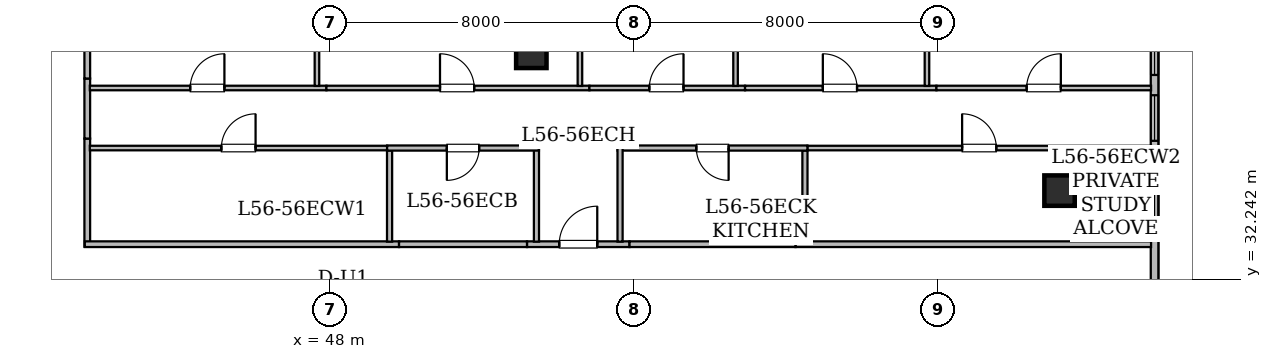
"""IFC4 building model, lengths in metres.
Left out: names, types, materials, properties, quantities, classifications, styles, units other than length and angle.
Written with IfcOpenShell. Run it as: python <this file> out.ifc"""

import sys

from ifc_helpers import new_model, si_unit, direction, frame, frame_2d, origin, origin_2d, place, context, subcontext, project, spatial, rectangle, hollow_rectangle, extrude, element, fill, save


model = new_model("IFC4")
c1 = context("Model", 3, precision=1e-05, world=origin(), true_north=direction((0.0, 1.0)))
c2 = subcontext(c1, "Body", "Model", "MODEL_VIEW")
j1 = project(units=[si_unit("LENGTHUNIT", "METRE"), si_unit("PLANEANGLEUNIT", "RADIAN")], contexts=[c1])
p1 = place(None, origin())
s1 = spatial("IfcSite", under=j1, at=p1, CompositionType="ELEMENT")
p2 = place(p1, origin())
s2 = spatial("IfcBuilding", under=s1, at=p2, CompositionType="ELEMENT")
p3 = place(p2, frame((0.0, 0.0, 220.85)))
s3 = spatial("IfcBuildingStorey", under=s2, at=p3, CompositionType="ELEMENT", Elevation=220.85)
for number, where, z_axis, x_axis in (
    (1, (67.2, 34.575, 0.0), (0.0, 0.0, 1.0), (1.0, 0.0, 0.0)),
    (2, (53.3, 38.2, 0.0), (0.0, 0.0, 1.0), (1.0, 0.0, 0.0)),
):
    element("IfcColumn", number, at=place(p3, frame(where, z_axis=z_axis, x_axis=x_axis)), inside=s3, PredefinedType="COLUMN", context=c2, shape_type="SweptSolid", body=[
        extrude(hollow_rectangle(XDim=0.8, YDim=0.8, WallThickness=0.04, at=origin_2d()), origin(), (0.0, 0.0, 1.0), 3.65),
    ])
p4 = place(p3, frame((69.7, 39.896, 0.0), z_axis=(0.0, 0.0, 1.0), x_axis=(0.0, -1.0, 0.0)))
e3 = element("IfcWall", 3, at=p4, inside=s3, PredefinedType="STANDARD", context=c2, shape_type="SweptSolid", body=[
    extrude(rectangle(XDim=8.863, YDim=0.2, at=frame_2d((4.432, 0.0))), origin(), (0.0, 0.0, 1.0), 3.43),
])
p5 = place(p4, frame((4.641, 0.0, 0.85)))
e4 = element("IfcOpeningElement", 4, at=p5, cuts=e3, PredefinedType="OPENING", context=c2, shape_type="SweptSolid", body=[
    extrude(rectangle(XDim=1.65, YDim=1.55, at=frame_2d((0.825, 0.775))), frame((0.0, 0.11, 0.0), z_axis=(0.0, -1.0, 0.0), x_axis=(1.0, 0.0, 0.0)), (0.0, 0.0, 1.0), 0.22),
])
p6 = place(p4, frame((2.811, 0.0, 0.8)))
e5 = element("IfcOpeningElement", 5, at=p6, cuts=e3, PredefinedType="OPENING", context=c2, shape_type="SweptSolid", body=[
    extrude(rectangle(XDim=1.2, YDim=1.5, at=frame_2d((0.6, 0.75))), frame((0.0, 0.11, 0.0), z_axis=(0.0, -1.0, 0.0), x_axis=(1.0, 0.0, 0.0)), (0.0, 0.0, 1.0), 0.22),
])
p7 = place(p4, frame((0.628, 0.0, 0.85)))
e6 = element("IfcOpeningElement", 6, at=p7, cuts=e3, PredefinedType="OPENING", context=c2, shape_type="SweptSolid", body=[
    extrude(rectangle(XDim=1.65, YDim=1.55, at=frame_2d((0.825, 0.775))), frame((0.0, 0.11, 0.0), z_axis=(0.0, -1.0, 0.0), x_axis=(1.0, 0.0, 0.0)), (0.0, 0.0, 1.0), 0.22),
])
p8 = place(p3, frame((41.615, 35.944, 0.0), z_axis=(0.0, 0.0, 1.0), x_axis=(0.0, -1.0, 0.0)))
e7 = element("IfcWall", 7, at=p8, inside=s3, PredefinedType="STANDARD", context=c2, shape_type="SweptSolid", body=[
    extrude(rectangle(XDim=2.844, YDim=0.15, at=frame_2d((1.422, 0.0))), origin(), (0.0, 0.0, 1.0), 3.065),
])
p9 = place(p3, frame((41.55, 33.165, 0.0), z_axis=(0.0, 0.0, 1.0), x_axis=(1.0, 0.0, 0.0)))
e8 = element("IfcWall", 8, at=p9, inside=s3, PredefinedType="STANDARD", context=c2, shape_type="SweptSolid", body=[
    extrude(rectangle(XDim=8.269, YDim=0.15, at=frame_2d((4.135, 0.0))), origin(), (0.0, 0.0, 1.0), 3.065),
])
p10 = place(p3, frame((60.251, 33.165, 0.0), z_axis=(0.0, 0.0, 1.0), x_axis=(1.0, 0.0, 0.0)))
e9 = element("IfcWall", 9, at=p10, inside=s3, PredefinedType="STANDARD", context=c2, shape_type="SweptSolid", body=[
    extrude(rectangle(XDim=9.357, YDim=0.15, at=frame_2d((4.678, 0.0))), origin(), (0.0, 0.0, 1.0), 2.887),
])
p11 = place(p3, frame((41.615, 37.524, 0.0), z_axis=(0.0, 0.0, 1.0), x_axis=(0.0, -1.0, 0.0)))
e10 = element("IfcWall", 10, at=p11, inside=s3, PredefinedType="STANDARD", context=c2, shape_type="SweptSolid", body=[
    extrude(rectangle(XDim=1.58, YDim=0.15, at=frame_2d((0.79, 0.0))), origin(), (0.0, 0.0, 1.0), 2.725),
])
p12 = place(p3, frame((53.186, 33.165, 0.0), z_axis=(0.0, 0.0, 1.0), x_axis=(1.0, 0.0, 0.0)))
e11 = element("IfcWall", 11, at=p12, inside=s3, PredefinedType="STANDARD", context=c2, shape_type="SweptSolid", body=[
    extrude(rectangle(XDim=2.698, YDim=0.15, at=frame_2d((1.349, 0.0))), origin(), (0.0, 0.0, 1.0), 2.725),
])
p13 = place(p12, frame((0.849, 0.0, 0.0)))
e12 = element("IfcOpeningElement", 12, at=p13, cuts=e11, PredefinedType="OPENING", context=c2, shape_type="SweptSolid", body=[
    extrude(rectangle(XDim=1.0, YDim=2.15, at=frame_2d((0.5, 1.075))), frame((0.0, 0.085, 0.0), z_axis=(0.0, -1.0, 0.0), x_axis=(1.0, 0.0, 0.0)), (0.0, 0.0, 1.0), 0.17),
])
p14 = place(p3, frame((49.819, 33.165, 0.0), z_axis=(0.0, 0.0, 1.0), x_axis=(1.0, 0.0, 0.0)))
e13 = element("IfcWall", 13, at=p14, inside=s3, PredefinedType="STANDARD", context=c2, shape_type="SweptSolid", body=[
    extrude(rectangle(XDim=3.367, YDim=0.15, at=frame_2d((1.684, 0.0))), origin(), (0.0, 0.0, 1.0), 2.725),
])
p15 = place(p3, frame((55.884, 33.165, 0.0), z_axis=(0.0, 0.0, 1.0), x_axis=(1.0, 0.0, 0.0)))
e14 = element("IfcWall", 14, at=p15, inside=s3, PredefinedType="STANDARD", context=c2, shape_type="SweptSolid", body=[
    extrude(rectangle(XDim=4.367, YDim=0.15, at=frame_2d((2.184, 0.0))), origin(), (0.0, 0.0, 1.0), 3.065),
])
p16 = place(p3, frame((41.615, 39.1, 0.0), z_axis=(0.0, 0.0, 1.0), x_axis=(0.0, -1.0, 0.0)))
e15 = element("IfcWall", 15, at=p16, inside=s3, PredefinedType="STANDARD", context=c2, shape_type="SweptSolid", body=[
    extrude(rectangle(XDim=1.576, YDim=0.15, at=frame_2d((0.788, 0.0))), origin(), (0.0, 0.0, 1.0), 2.725),
])
p17 = place(p3, frame((41.682, 35.695, 0.0), z_axis=(0.0, 0.0, 1.0), x_axis=(1.0, 0.0, 0.0)))
e16 = element("IfcWall", 16, at=p17, inside=s3, PredefinedType="PARTITIONING", context=c2, shape_type="SweptSolid", body=[
    extrude(rectangle(XDim=7.823, YDim=0.12, at=frame_2d((3.912, 0.0))), origin(), (0.0, 0.0, 1.0), 3.43),
])
p18 = place(p17, frame((3.462, 0.0, 0.0)))
e17 = element("IfcOpeningElement", 17, at=p18, cuts=e16, PredefinedType="OPENING", context=c2, shape_type="SweptSolid", body=[
    extrude(rectangle(XDim=0.9, YDim=2.1, at=frame_2d((0.45, 1.05))), frame((0.0, 0.07, 0.0), z_axis=(0.0, -1.0, 0.0), x_axis=(1.0, 0.0, 0.0)), (0.0, 0.0, 1.0), 0.14),
])
p19 = place(p3, frame((49.57, 35.63, 0.0), z_axis=(0.0, 0.0, 1.0), x_axis=(0.0, -1.0, 0.0)))
e18 = element("IfcWall", 18, at=p19, inside=s3, PredefinedType="PARTITIONING", context=c2, shape_type="SweptSolid", body=[
    extrude(rectangle(XDim=2.398, YDim=0.135, at=frame_2d((1.199, 0.0))), origin(), (0.0, 0.0, 1.0), 3.065),
])
p20 = place(p3, frame((60.565, 35.695, 0.0), z_axis=(0.0, 0.0, 1.0), x_axis=(1.0, 0.0, 0.0)))
e19 = element("IfcWall", 19, at=p20, inside=s3, PredefinedType="PARTITIONING", context=c2, shape_type="SweptSolid", body=[
    extrude(rectangle(XDim=9.043, YDim=0.12, at=frame_2d((4.521, 0.0))), origin(), (0.0, 0.0, 1.0), 2.725),
])
p21 = place(p20, frame((4.071, 0.0, 0.0)))
e20 = element("IfcOpeningElement", 20, at=p21, cuts=e19, PredefinedType="OPENING", context=c2, shape_type="SweptSolid", body=[
    extrude(rectangle(XDim=0.9, YDim=2.1, at=frame_2d((0.45, 1.05))), frame((0.0, 0.07, 0.0), z_axis=(0.0, -1.0, 0.0), x_axis=(1.0, 0.0, 0.0)), (0.0, 0.0, 1.0), 0.14),
])
p22 = place(p3, frame((60.5, 33.232, 0.0), z_axis=(0.0, 0.0, 1.0), x_axis=(0.0, 1.0, 0.0)))
e21 = element("IfcWall", 21, at=p22, inside=s3, PredefinedType="PARTITIONING", context=c2, shape_type="SweptSolid", body=[
    extrude(rectangle(XDim=2.398, YDim=0.135, at=frame_2d((1.199, 0.0))), origin(), (0.0, 0.0, 1.0), 3.065),
])
p23 = place(p3, frame((53.435, 33.232, 0.0), z_axis=(0.0, 0.0, 1.0), x_axis=(0.0, 1.0, 0.0)))
e22 = element("IfcWall", 22, at=p23, inside=s3, PredefinedType="PARTITIONING", context=c2, shape_type="SweptSolid", body=[
    extrude(rectangle(XDim=2.528, YDim=0.135, at=frame_2d((1.264, 0.0))), origin(), (0.0, 0.0, 1.0), 2.725),
])
p24 = place(p3, frame((53.5, 35.695, 0.0), z_axis=(0.0, 0.0, 1.0), x_axis=(-1.0, 0.0, 0.0)))
e23 = element("IfcWall", 23, at=p24, inside=s3, PredefinedType="PARTITIONING", context=c2, shape_type="SweptSolid", body=[
    extrude(rectangle(XDim=3.995, YDim=0.135, at=frame_2d((1.998, 0.0))), origin(), (0.0, 0.0, 1.0), 2.725),
])
p25 = place(p24, frame((1.573, 0.0, 0.0)))
e24 = element("IfcOpeningElement", 24, at=p25, cuts=e23, PredefinedType="OPENING", context=c2, shape_type="SweptSolid", body=[
    extrude(rectangle(XDim=0.85, YDim=2.1, at=frame_2d((0.425, 1.05))), frame((0.0, 0.077, 0.0), z_axis=(0.0, -1.0, 0.0), x_axis=(1.0, 0.0, 0.0)), (0.0, 0.0, 1.0), 0.155),
])
p26 = place(p3, frame((60.565, 35.695, 0.0), z_axis=(0.0, 0.0, 1.0), x_axis=(-1.0, 0.0, 0.0)))
e25 = element("IfcWall", 25, at=p26, inside=s3, PredefinedType="PARTITIONING", context=c2, shape_type="SweptSolid", body=[
    extrude(rectangle(XDim=4.995, YDim=0.135, at=frame_2d((2.498, 0.0))), origin(), (0.0, 0.0, 1.0), 3.43),
])
p27 = place(p26, frame((2.073, 0.0, 0.0)))
e26 = element("IfcOpeningElement", 26, at=p27, cuts=e25, PredefinedType="OPENING", context=c2, shape_type="SweptSolid", body=[
    extrude(rectangle(XDim=0.85, YDim=2.1, at=frame_2d((0.425, 1.05))), frame((0.0, 0.077, 0.0), z_axis=(0.0, -1.0, 0.0), x_axis=(1.0, 0.0, 0.0)), (0.0, 0.0, 1.0), 0.155),
])
p28 = place(p3, frame((55.635, 35.76, 0.0), z_axis=(0.0, 0.0, 1.0), x_axis=(0.0, -1.0, 0.0)))
e27 = element("IfcWall", 27, at=p28, inside=s3, PredefinedType="PARTITIONING", context=c2, shape_type="SweptSolid", body=[
    extrude(rectangle(XDim=2.528, YDim=0.135, at=frame_2d((1.264, 0.0))), origin(), (0.0, 0.0, 1.0), 3.065),
])
p29 = place(p3, frame((41.682, 37.275, 0.0), z_axis=(0.0, 0.0, 1.0), x_axis=(1.0, 0.0, 0.0)))
e28 = element("IfcWall", 28, at=p29, inside=s3, PredefinedType="PARTITIONING", context=c2, shape_type="SweptSolid", body=[
    extrude(rectangle(XDim=6.226, YDim=0.12, at=frame_2d((3.113, 0.0))), origin(), (0.0, 0.0, 1.0), 2.725),
])
p30 = place(p29, frame((2.642, 0.0, 0.0)))
e29 = element("IfcOpeningElement", 29, at=p30, cuts=e28, PredefinedType="OPENING", context=c2, shape_type="SweptSolid", body=[
    extrude(rectangle(XDim=0.9, YDim=2.1, at=frame_2d((0.45, 1.05))), frame((0.0, 0.07, 0.0), z_axis=(0.0, -1.0, 0.0), x_axis=(1.0, 0.0, 0.0)), (0.0, 0.0, 1.0), 0.14),
])
p31 = place(p3, frame((47.908, 37.275, 0.0), z_axis=(0.0, 0.0, 1.0), x_axis=(1.0, 0.0, 0.0)))
e30 = element("IfcWall", 30, at=p31, inside=s3, PredefinedType="PARTITIONING", context=c2, shape_type="SweptSolid", body=[
    extrude(rectangle(XDim=6.921, YDim=0.12, at=frame_2d((3.46, 0.0))), origin(), (0.0, 0.0, 1.0), 2.725),
])
p32 = place(p31, frame((2.989, 0.0, 0.0)))
e31 = element("IfcOpeningElement", 31, at=p32, cuts=e30, PredefinedType="OPENING", context=c2, shape_type="SweptSolid", body=[
    extrude(rectangle(XDim=0.9, YDim=2.1, at=frame_2d((0.45, 1.05))), frame((0.0, 0.07, 0.0), z_axis=(0.0, -1.0, 0.0), x_axis=(1.0, 0.0, 0.0)), (0.0, 0.0, 1.0), 0.14),
])
p33 = place(p3, frame((54.829, 37.275, 0.0), z_axis=(0.0, 0.0, 1.0), x_axis=(1.0, 0.0, 0.0)))
e32 = element("IfcWall", 32, at=p33, inside=s3, PredefinedType="PARTITIONING", context=c2, shape_type="SweptSolid", body=[
    extrude(rectangle(XDim=4.095, YDim=0.12, at=frame_2d((2.047, 0.0))), origin(), (0.0, 0.0, 1.0), 2.725),
])
p34 = place(p33, frame((1.576, 0.0, 0.0)))
e33 = element("IfcOpeningElement", 33, at=p34, cuts=e32, PredefinedType="OPENING", context=c2, shape_type="SweptSolid", body=[
    extrude(rectangle(XDim=0.9, YDim=2.1, at=frame_2d((0.45, 1.05))), frame((0.0, 0.07, 0.0), z_axis=(0.0, -1.0, 0.0), x_axis=(1.0, 0.0, 0.0)), (0.0, 0.0, 1.0), 0.14),
])
p35 = place(p3, frame((58.924, 37.275, 0.0), z_axis=(0.0, 0.0, 1.0), x_axis=(1.0, 0.0, 0.0)))
e34 = element("IfcWall", 34, at=p35, inside=s3, PredefinedType="PARTITIONING", context=c2, shape_type="SweptSolid", body=[
    extrude(rectangle(XDim=5.036, YDim=0.12, at=frame_2d((2.518, 0.0))), origin(), (0.0, 0.0, 1.0), 3.43),
])
p36 = place(p35, frame((2.047, 0.0, 0.0)))
e35 = element("IfcOpeningElement", 35, at=p36, cuts=e34, PredefinedType="OPENING", context=c2, shape_type="SweptSolid", body=[
    extrude(rectangle(XDim=0.9, YDim=2.1, at=frame_2d((0.45, 1.05))), frame((0.0, 0.07, 0.0), z_axis=(0.0, -1.0, 0.0), x_axis=(1.0, 0.0, 0.0)), (0.0, 0.0, 1.0), 0.14),
])
p37 = place(p3, frame((63.96, 37.275, 0.0), z_axis=(0.0, 0.0, 1.0), x_axis=(1.0, 0.0, 0.0)))
e36 = element("IfcWall", 36, at=p37, inside=s3, PredefinedType="PARTITIONING", context=c2, shape_type="SweptSolid", body=[
    extrude(rectangle(XDim=5.648, YDim=0.12, at=frame_2d((2.824, 0.0))), origin(), (0.0, 0.0, 1.0), 2.887),
])
p38 = place(p37, frame((2.374, 0.0, 0.0)))
e37 = element("IfcOpeningElement", 37, at=p38, cuts=e36, PredefinedType="OPENING", context=c2, shape_type="SweptSolid", body=[
    extrude(rectangle(XDim=0.9, YDim=2.1, at=frame_2d((0.45, 1.05))), frame((0.0, 0.07, 0.0), z_axis=(0.0, -1.0, 0.0), x_axis=(1.0, 0.0, 0.0)), (0.0, 0.0, 1.0), 0.14),
])
for number, where, z_axis, x_axis in (
    (38, (47.659, 43.808, 0.0), (0.0, 0.0, 1.0), (0.0, -1.0, 0.0)),
    (39, (54.579, 43.808, 0.0), (0.0, 0.0, 1.0), (0.0, -1.0, 0.0)),
    (40, (58.674, 43.808, 0.0), (0.0, 0.0, 1.0), (0.0, -1.0, 0.0)),
):
    element("IfcWall", number, at=place(p3, frame(where, z_axis=z_axis, x_axis=x_axis)), inside=s3, PredefinedType="PARTITIONING", context=c2, shape_type="SweptSolid", body=[
        extrude(rectangle(XDim=6.479, YDim=0.12, at=frame_2d((3.24, 0.0))), origin(), (0.0, 0.0, 1.0), 2.725),
    ])
p39 = place(p3, frame((63.711, 43.808, 0.0), z_axis=(0.0, 0.0, 1.0), x_axis=(0.0, -1.0, 0.0)))
e41 = element("IfcWall", 41, at=p39, inside=s3, PredefinedType="PARTITIONING", context=c2, shape_type="SweptSolid", body=[
    extrude(rectangle(XDim=6.479, YDim=0.12, at=frame_2d((3.24, 0.0))), origin(), (0.0, 0.0, 1.0), 2.887),
])
p40 = place(p5, origin())
e42 = element("IfcWindow", 42, at=p40, inside=s3, PartitioningType="SINGLE_PANEL", PredefinedType="WINDOW", context=c2, shape_type="SweptSolid", body=[
    extrude(rectangle(XDim=1.65, YDim=1.55, at=frame_2d((0.825, 0.775))), frame((0.0, 0.03, 0.0), z_axis=(0.0, -1.0, 0.0), x_axis=(1.0, 0.0, 0.0)), (0.0, 0.0, 1.0), 0.06),
])
fill(e4, e42)
p41 = place(p6, origin())
e43 = element("IfcWindow", 43, at=p41, inside=s3, PartitioningType="SINGLE_PANEL", PredefinedType="WINDOW", context=c2, shape_type="SweptSolid", body=[
    extrude(rectangle(XDim=1.2, YDim=1.5, at=frame_2d((0.6, 0.75))), frame((0.0, 0.03, 0.0), z_axis=(0.0, -1.0, 0.0), x_axis=(1.0, 0.0, 0.0)), (0.0, 0.0, 1.0), 0.06),
])
fill(e5, e43)
p42 = place(p7, origin())
e44 = element("IfcWindow", 44, at=p42, inside=s3, PartitioningType="SINGLE_PANEL", PredefinedType="WINDOW", context=c2, shape_type="SweptSolid", body=[
    extrude(rectangle(XDim=1.65, YDim=1.55, at=frame_2d((0.825, 0.775))), frame((0.0, 0.03, 0.0), z_axis=(0.0, -1.0, 0.0), x_axis=(1.0, 0.0, 0.0)), (0.0, 0.0, 1.0), 0.06),
])
fill(e6, e44)
p43 = place(p13, origin())
e45 = element("IfcDoor", 45, at=p43, inside=s3, OperationType="SINGLE_SWING_RIGHT", PredefinedType="DOOR", context=c2, shape_type="SweptSolid", body=[
    extrude(rectangle(XDim=1.0, YDim=2.15, at=frame_2d((0.5, 1.075))), frame((0.0, 0.025, 0.0), z_axis=(0.0, -1.0, 0.0), x_axis=(1.0, 0.0, 0.0)), (0.0, 0.0, 1.0), 0.05),
])
fill(e12, e45)
p44 = place(p18, origin())
e46 = element("IfcDoor", 46, at=p44, inside=s3, OperationType="SINGLE_SWING_RIGHT", PredefinedType="DOOR", context=c2, shape_type="SweptSolid", body=[
    extrude(rectangle(XDim=0.9, YDim=2.1, at=frame_2d((0.45, 1.05))), frame((0.0, 0.025, 0.0), z_axis=(0.0, -1.0, 0.0), x_axis=(1.0, 0.0, 0.0)), (0.0, 0.0, 1.0), 0.05),
])
fill(e17, e46)
p45 = place(p21, origin())
e47 = element("IfcDoor", 47, at=p45, inside=s3, OperationType="SINGLE_SWING_LEFT", PredefinedType="DOOR", context=c2, shape_type="SweptSolid", body=[
    extrude(rectangle(XDim=0.9, YDim=2.1, at=frame_2d((0.45, 1.05))), frame((0.0, 0.025, 0.0), z_axis=(0.0, -1.0, 0.0), x_axis=(1.0, 0.0, 0.0)), (0.0, 0.0, 1.0), 0.05),
])
fill(e20, e47)
p46 = place(p25, origin())
e48 = element("IfcDoor", 48, at=p46, inside=s3, OperationType="SINGLE_SWING_RIGHT", PredefinedType="DOOR", context=c2, shape_type="SweptSolid", body=[
    extrude(rectangle(XDim=0.85, YDim=2.1, at=frame_2d((0.425, 1.05))), frame((0.0, 0.025, 0.0), z_axis=(0.0, -1.0, 0.0), x_axis=(1.0, 0.0, 0.0)), (0.0, 0.0, 1.0), 0.05),
])
fill(e24, e48)
p47 = place(p27, origin())
e49 = element("IfcDoor", 49, at=p47, inside=s3, OperationType="SINGLE_SWING_LEFT", PredefinedType="DOOR", context=c2, shape_type="SweptSolid", body=[
    extrude(rectangle(XDim=0.85, YDim=2.1, at=frame_2d((0.425, 1.05))), frame((0.0, 0.025, 0.0), z_axis=(0.0, -1.0, 0.0), x_axis=(1.0, 0.0, 0.0)), (0.0, 0.0, 1.0), 0.05),
])
fill(e26, e49)
p48 = place(p30, origin())
e50 = element("IfcDoor", 50, at=p48, inside=s3, OperationType="SINGLE_SWING_RIGHT", PredefinedType="DOOR", context=c2, shape_type="SweptSolid", body=[
    extrude(rectangle(XDim=0.9, YDim=2.1, at=frame_2d((0.45, 1.05))), frame((0.0, 0.025, 0.0), z_axis=(0.0, -1.0, 0.0), x_axis=(1.0, 0.0, 0.0)), (0.0, 0.0, 1.0), 0.05),
])
fill(e29, e50)
p49 = place(p32, origin())
e51 = element("IfcDoor", 51, at=p49, inside=s3, OperationType="SINGLE_SWING_LEFT", PredefinedType="DOOR", context=c2, shape_type="SweptSolid", body=[
    extrude(rectangle(XDim=0.9, YDim=2.1, at=frame_2d((0.45, 1.05))), frame((0.0, 0.025, 0.0), z_axis=(0.0, -1.0, 0.0), x_axis=(1.0, 0.0, 0.0)), (0.0, 0.0, 1.0), 0.05),
])
fill(e31, e51)
p50 = place(p34, origin())
e52 = element("IfcDoor", 52, at=p50, inside=s3, OperationType="SINGLE_SWING_RIGHT", PredefinedType="DOOR", context=c2, shape_type="SweptSolid", body=[
    extrude(rectangle(XDim=0.9, YDim=2.1, at=frame_2d((0.45, 1.05))), frame((0.0, 0.025, 0.0), z_axis=(0.0, -1.0, 0.0), x_axis=(1.0, 0.0, 0.0)), (0.0, 0.0, 1.0), 0.05),
])
fill(e33, e52)
p51 = place(p36, origin())
e53 = element("IfcDoor", 53, at=p51, inside=s3, OperationType="SINGLE_SWING_LEFT", PredefinedType="DOOR", context=c2, shape_type="SweptSolid", body=[
    extrude(rectangle(XDim=0.9, YDim=2.1, at=frame_2d((0.45, 1.05))), frame((0.0, 0.025, 0.0), z_axis=(0.0, -1.0, 0.0), x_axis=(1.0, 0.0, 0.0)), (0.0, 0.0, 1.0), 0.05),
])
fill(e35, e53)
p52 = place(p38, origin())
e54 = element("IfcDoor", 54, at=p52, inside=s3, OperationType="SINGLE_SWING_RIGHT", PredefinedType="DOOR", context=c2, shape_type="SweptSolid", body=[
    extrude(rectangle(XDim=0.9, YDim=2.1, at=frame_2d((0.45, 1.05))), frame((0.0, 0.025, 0.0), z_axis=(0.0, -1.0, 0.0), x_axis=(1.0, 0.0, 0.0)), (0.0, 0.0, 1.0), 0.05),
])
fill(e37, e54)
save(model, sys.argv[1])
